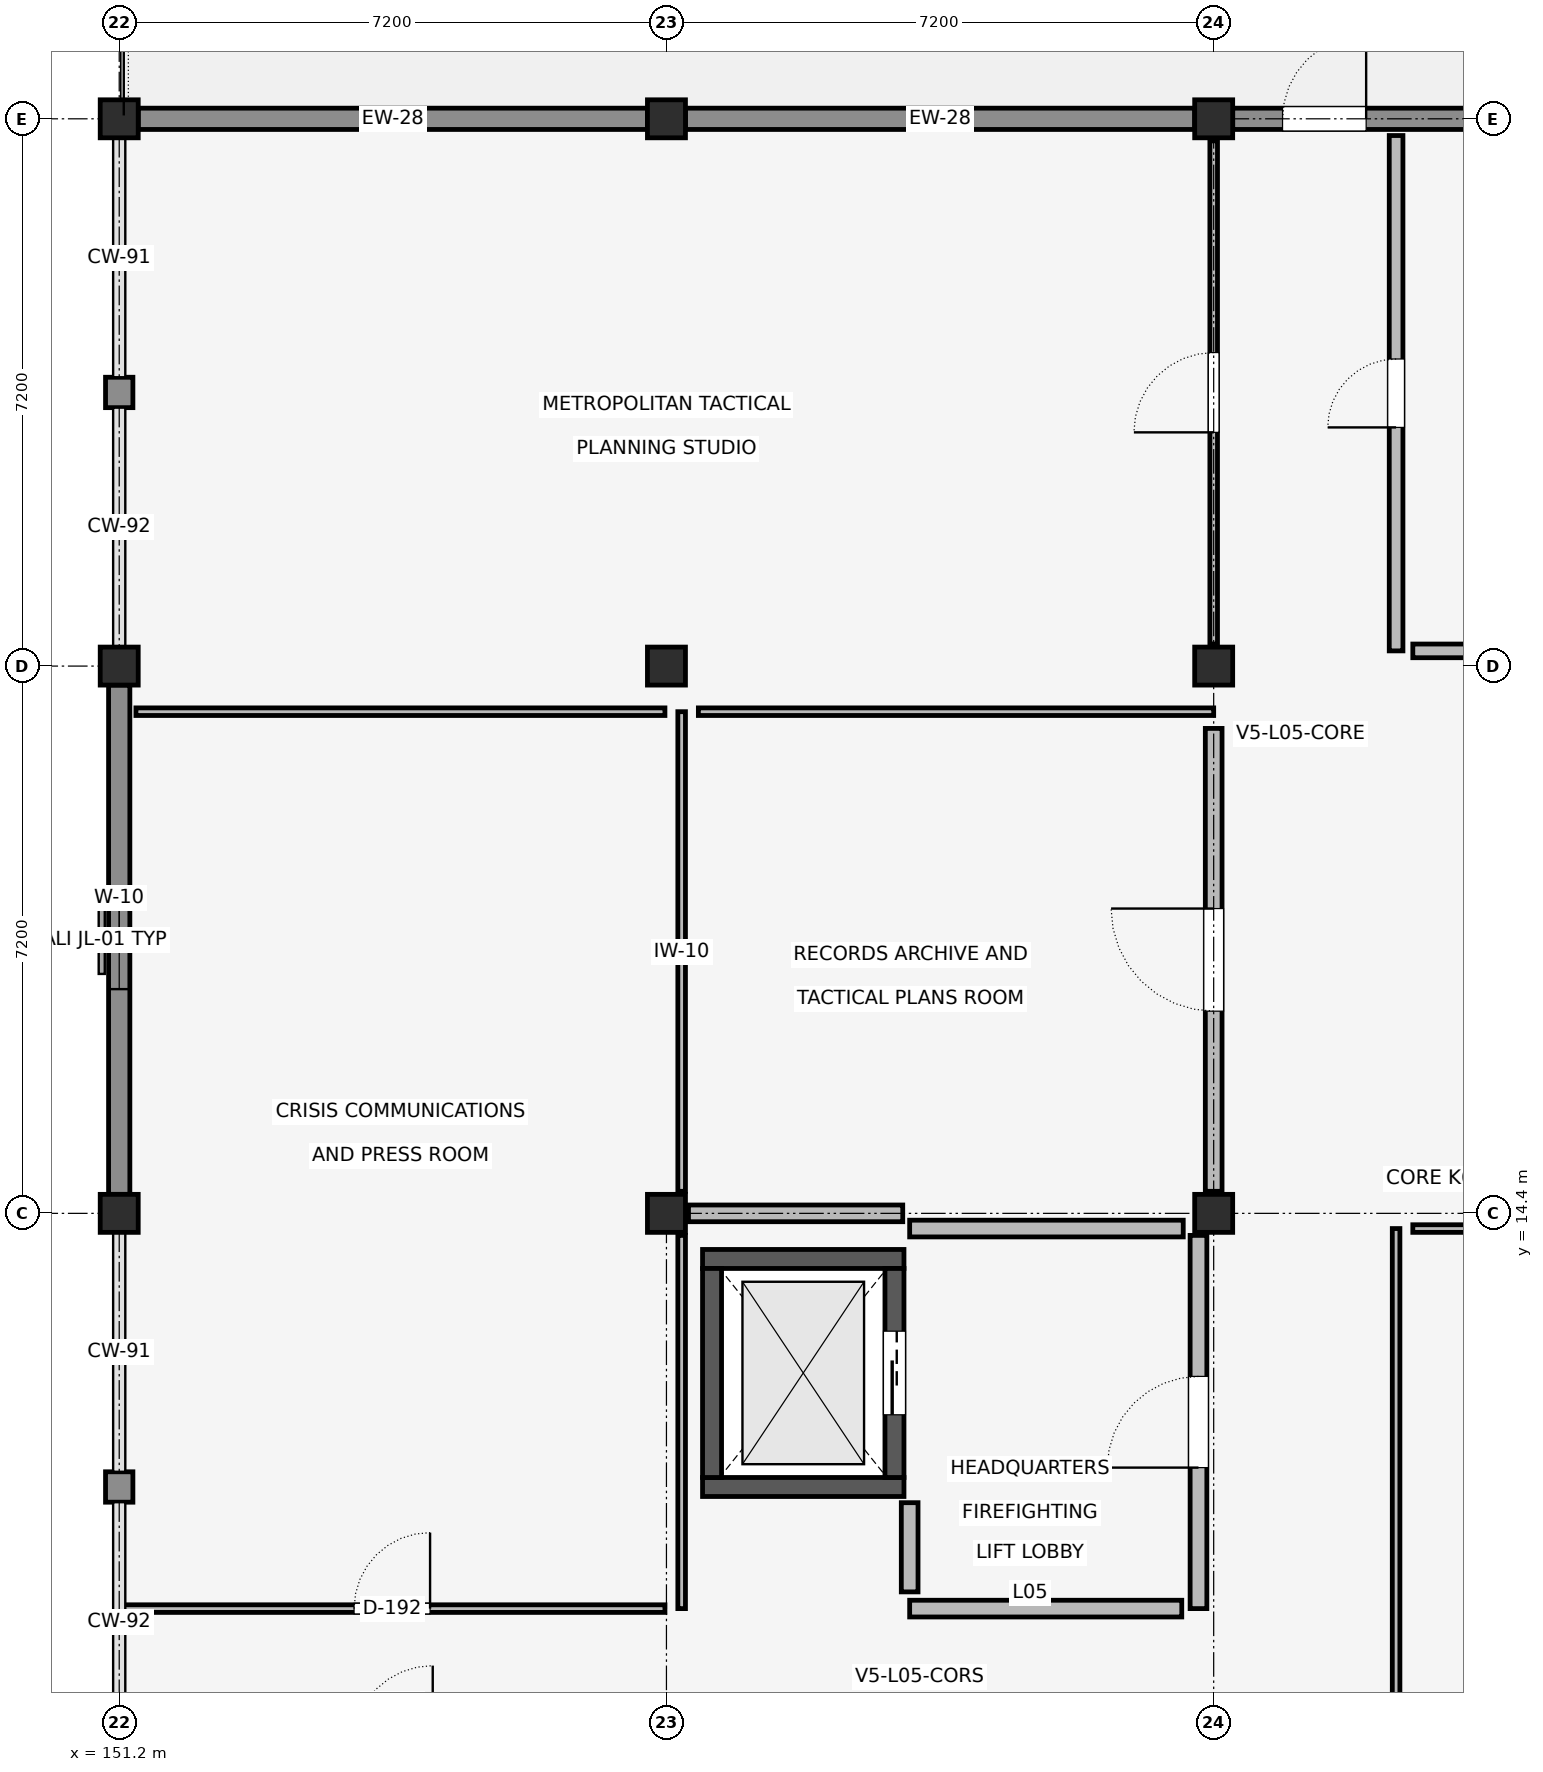
"""IFC4 building model, lengths in metres.
Left out: names, types, materials, properties, quantities, classifications, styles, units other than length and angle.
Written with IfcOpenShell. Run it as: python <this file> out.ifc"""

import sys

from ifc_helpers import new_model, si_unit, direction, frame, frame_2d, origin, origin_2d, place, context, subcontext, project, spatial, rectangle, extrude, element, fill, save


model = new_model("IFC4")
c1 = context("Model", 3, precision=1e-05, world=origin(), true_north=direction((0.0, 1.0)))
c2 = subcontext(c1, "Body", "Model", "MODEL_VIEW")
j1 = project(units=[si_unit("LENGTHUNIT", "METRE"), si_unit("PLANEANGLEUNIT", "RADIAN")], contexts=[c1])
p1 = place(None, origin())
s1 = spatial("IfcSite", under=j1, at=p1, CompositionType="ELEMENT")
p2 = place(p1, origin())
s2 = spatial("IfcBuilding", under=s1, at=p2, CompositionType="ELEMENT")
p3 = place(p2, frame((0.0, 0.0, 21.3)))
s3 = spatial("IfcBuildingStorey", under=s2, at=p3, CompositionType="ELEMENT", Elevation=21.3)
for number, where, z_axis, x_axis in (
    (1, (151.2, 14.4, 0.0), (0.0, 0.0, 1.0), (1.0, 0.0, 0.0)),
    (2, (151.2, 21.6, 0.0), (0.0, 0.0, 1.0), (1.0, 0.0, 0.0)),
    (3, (151.2, 28.8, 0.0), (0.0, 0.0, 1.0), (1.0, 0.0, 0.0)),
    (4, (158.4, 14.4, 0.0), (0.0, 0.0, 1.0), (1.0, 0.0, 0.0)),
    (5, (158.4, 21.6, 0.0), (0.0, 0.0, 1.0), (1.0, 0.0, 0.0)),
    (6, (158.4, 28.8, 0.0), (0.0, 0.0, 1.0), (1.0, 0.0, 0.0)),
    (7, (165.6, 14.4, 0.0), (0.0, 0.0, 1.0), (1.0, 0.0, 0.0)),
    (8, (165.6, 21.6, 0.0), (0.0, 0.0, 1.0), (1.0, 0.0, 0.0)),
    (9, (165.6, 28.8, 0.0), (0.0, 0.0, 1.0), (1.0, 0.0, 0.0)),
):
    element("IfcColumn", number, at=place(p3, frame(where, z_axis=z_axis, x_axis=x_axis)), inside=s3, PredefinedType="COLUMN", context=c2, shape_type="SweptSolid", body=[
        extrude(rectangle(XDim=0.5, YDim=0.5, at=origin_2d()), origin(), (0.0, 0.0, 1.0), 3.9),
    ])
for number, where, z_axis, x_axis in (
    (10, (158.875, 10.8, 0.0), (0.0, 0.0, 1.0), (1.0, 0.0, 0.0)),
    (11, (158.875, 13.8, 0.0), (0.0, 0.0, 1.0), (1.0, 0.0, 0.0)),
):
    element("IfcWall", number, at=place(p3, frame(where, z_axis=z_axis, x_axis=x_axis)), inside=s3, PredefinedType="SHEAR", context=c2, shape_type="SweptSolid", body=[
        extrude(rectangle(XDim=2.65, YDim=0.25, at=frame_2d((1.325, 0.0))), origin(), (0.0, 0.0, 1.0), 3.65),
    ])
p4 = place(p3, frame((159.0, 10.925, 0.0), z_axis=(0.0, 0.0, 1.0), x_axis=(0.0, 1.0, 0.0)))
e12 = element("IfcWall", 12, at=p4, inside=s3, PredefinedType="SHEAR", context=c2, shape_type="SweptSolid", body=[
    extrude(rectangle(XDim=2.75, YDim=0.25, at=frame_2d((1.375, 0.0))), origin(), (0.0, 0.0, 1.0), 3.65),
])
p5 = place(p3, frame((161.4, 10.925, 0.0), z_axis=(0.0, 0.0, 1.0), x_axis=(0.0, 1.0, 0.0)))
e13 = element("IfcWall", 13, at=p5, inside=s3, PredefinedType="SHEAR", context=c2, shape_type="SweptSolid", body=[
    extrude(rectangle(XDim=2.75, YDim=0.25, at=frame_2d((1.375, 0.0))), origin(), (0.0, 0.0, 1.0), 3.65),
])
p6 = place(p5, frame((0.825, 0.0, 0.0)))
e14 = element("IfcOpeningElement", 14, at=p6, cuts=e13, PredefinedType="OPENING", context=c2, shape_type="SweptSolid", body=[
    extrude(rectangle(XDim=1.1, YDim=2.15, at=frame_2d((0.55, 1.075))), frame((0.0, 0.137, 0.0), z_axis=(0.0, -1.0, 0.0), x_axis=(1.0, 0.0, 0.0)), (0.0, 0.0, 1.0), 0.274),
])
p7 = place(p3, frame((172.55, 28.8, 0.0), z_axis=(0.0, 0.0, 1.0), x_axis=(-1.0, 0.0, 0.0)))
e15 = element("IfcWall", 15, at=p7, inside=s3, PredefinedType="ELEMENTEDWALL", context=c2, shape_type="SweptSolid", body=[
    extrude(rectangle(XDim=6.7, YDim=0.28, at=frame_2d((3.35, 0.0))), origin(), (0.0, 0.0, 1.0), 2.94),
])
p8 = place(p7, frame((4.944, 0.0, 0.0)))
e16 = element("IfcOpeningElement", 16, at=p8, cuts=e15, PredefinedType="OPENING", context=c2, shape_type="SweptSolid", body=[
    extrude(rectangle(XDim=1.1, YDim=2.15, at=frame_2d((0.55, 1.075))), frame((0.0, 0.152, 0.0), z_axis=(0.0, -1.0, 0.0), x_axis=(1.0, 0.0, 0.0)), (0.0, 0.0, 1.0), 0.304),
])
p9 = place(p3, frame((165.35, 28.8, 0.0), z_axis=(0.0, 0.0, 1.0), x_axis=(-1.0, 0.0, 0.0)))
e17 = element("IfcWall", 17, at=p9, inside=s3, PredefinedType="ELEMENTEDWALL", context=c2, shape_type="SweptSolid", body=[
    extrude(rectangle(XDim=6.7, YDim=0.28, at=frame_2d((3.35, 0.0))), origin(), (0.0, 0.0, 1.0), 2.89),
])
p10 = place(p3, frame((158.15, 28.8, 0.0), z_axis=(0.0, 0.0, 1.0), x_axis=(-1.0, 0.0, 0.0)))
e18 = element("IfcWall", 18, at=p10, inside=s3, PredefinedType="ELEMENTEDWALL", context=c2, shape_type="SweptSolid", body=[
    extrude(rectangle(XDim=6.7, YDim=0.28, at=frame_2d((3.35, 0.0))), origin(), (0.0, 0.0, 1.0), 2.94),
])
p11 = place(p3, frame((151.2, 25.4, 0.0), z_axis=(0.0, 0.0, 1.0), x_axis=(0.0, -1.0, 0.0)))
e19 = element("IfcWall", 19, at=p11, inside=s3, PredefinedType="SOLIDWALL", context=c2, shape_type="SweptSolid", body=[
    extrude(rectangle(XDim=0.4, YDim=0.36, at=frame_2d((0.2, 0.0))), origin(), (0.0, 0.0, 1.0), 3.04),
])
p12 = place(p3, frame((151.2, 21.35, 0.0), z_axis=(0.0, 0.0, 1.0), x_axis=(0.0, -1.0, 0.0)))
e20 = element("IfcWall", 20, at=p12, inside=s3, PredefinedType="ELEMENTEDWALL", context=c2, shape_type="SweptSolid", body=[
    extrude(rectangle(XDim=6.7, YDim=0.28, at=frame_2d((3.35, 0.0))), origin(), (0.0, 0.0, 1.0), 2.99),
])
p13 = place(p12, frame((2.7, 0.0, 0.85)))
e21 = element("IfcOpeningElement", 21, at=p13, cuts=e20, PredefinedType="OPENING", context=c2, shape_type="SweptSolid", body=[
    extrude(rectangle(XDim=1.3, YDim=1.85, at=frame_2d((0.65, 0.925))), frame((0.0, 0.152, 0.0), z_axis=(0.0, -1.0, 0.0), x_axis=(1.0, 0.0, 0.0)), (0.0, 0.0, 1.0), 0.304),
])
p14 = place(p3, frame((151.2, 11.0, 0.0), z_axis=(0.0, 0.0, 1.0), x_axis=(0.0, -1.0, 0.0)))
e22 = element("IfcWall", 22, at=p14, inside=s3, PredefinedType="SOLIDWALL", context=c2, shape_type="SweptSolid", body=[
    extrude(rectangle(XDim=0.4, YDim=0.36, at=frame_2d((0.2, 0.0))), origin(), (0.0, 0.0, 1.0), 3.04),
])
p15 = place(p3, frame((165.4, 9.2, 0.0), z_axis=(0.0, 0.0, 1.0), x_axis=(0.0, 1.0, 0.0)))
e23 = element("IfcWall", 23, at=p15, inside=s3, PredefinedType="STANDARD", context=c2, shape_type="SweptSolid", body=[
    extrude(rectangle(XDim=4.91, YDim=0.22, at=frame_2d((2.455, 0.0))), origin(), (0.0, 0.0, 1.0), 3.038),
])
p16 = place(p15, frame((1.855, 0.0, 0.0)))
e24 = element("IfcOpeningElement", 24, at=p16, cuts=e23, PredefinedType="OPENING", context=c2, shape_type="SweptSolid", body=[
    extrude(rectangle(XDim=1.2, YDim=2.2, at=frame_2d((0.6, 1.1))), frame((0.0, 0.122, 0.0), z_axis=(0.0, -1.0, 0.0), x_axis=(1.0, 0.0, 0.0)), (0.0, 0.0, 1.0), 0.244),
])
p17 = place(p3, frame((161.6, 9.2, 0.0), z_axis=(0.0, 0.0, 1.0), x_axis=(1.0, 0.0, 0.0)))
e25 = element("IfcWall", 25, at=p17, inside=s3, PredefinedType="STANDARD", context=c2, shape_type="SweptSolid", body=[
    extrude(rectangle(XDim=3.58, YDim=0.22, at=frame_2d((1.79, 0.0))), origin(), (0.0, 0.0, 1.0), 3.62),
])
p18 = place(p3, frame((161.6, 14.2, 0.0), z_axis=(0.0, 0.0, 1.0), x_axis=(1.0, 0.0, 0.0)))
e26 = element("IfcWall", 26, at=p18, inside=s3, PredefinedType="STANDARD", context=c2, shape_type="SweptSolid", body=[
    extrude(rectangle(XDim=3.599, YDim=0.22, at=frame_2d((1.8, 0.0))), origin(), (0.0, 0.0, 1.0), 2.938),
])
p19 = place(p3, frame((161.6, 9.42, 0.0), z_axis=(0.0, 0.0, 1.0), x_axis=(0.0, 1.0, 0.0)))
e27 = element("IfcWall", 27, at=p19, inside=s3, PredefinedType="STANDARD", context=c2, shape_type="SweptSolid", body=[
    extrude(rectangle(XDim=1.174, YDim=0.22, at=frame_2d((0.587, 0.0))), origin(), (0.0, 0.0, 1.0), 3.62),
])
p20 = place(p3, frame((168.0, 0.0, 0.0), z_axis=(0.0, 0.0, 1.0), x_axis=(0.0, 1.0, 0.0)))
e28 = element("IfcWall", 28, at=p20, inside=s3, PredefinedType="PARTITIONING", context=c2, shape_type="SweptSolid", body=[
    extrude(rectangle(XDim=14.2, YDim=0.1, at=frame_2d((7.1, 0.0))), origin(), (0.0, 0.0, 1.0), 2.938),
])
p21 = place(p20, frame((6.6, 0.0, 0.0)))
e29 = element("IfcOpeningElement", 29, at=p21, cuts=e28, PredefinedType="OPENING", context=c2, shape_type="SweptSolid", body=[
    extrude(rectangle(XDim=1.0, YDim=2.15, at=frame_2d((0.5, 1.075))), frame((0.0, 0.062, 0.0), z_axis=(0.0, -1.0, 0.0), x_axis=(1.0, 0.0, 0.0)), (0.0, 0.0, 1.0), 0.124),
])
p22 = place(p3, frame((168.22, 14.2, 0.0), z_axis=(0.0, 0.0, 1.0), x_axis=(1.0, 0.0, 0.0)))
e30 = element("IfcWall", 30, at=p22, inside=s3, PredefinedType="PARTITIONING", context=c2, shape_type="SweptSolid", body=[
    extrude(rectangle(XDim=4.29, YDim=0.1, at=frame_2d((2.145, 0.0))), origin(), (0.0, 0.0, 1.0), 3.62),
])
p23 = place(p3, frame((158.6, 9.2, 0.0), z_axis=(0.0, 0.0, 1.0), x_axis=(0.0, 1.0, 0.0)))
e31 = element("IfcWall", 31, at=p23, inside=s3, PredefinedType="PARTITIONING", context=c2, shape_type="SweptSolid", body=[
    extrude(rectangle(XDim=4.91, YDim=0.1, at=frame_2d((2.455, 0.0))), origin(), (0.0, 0.0, 1.0), 3.038),
])
p24 = place(p3, frame((158.6, 14.69, 0.0), z_axis=(0.0, 0.0, 1.0), x_axis=(0.0, 1.0, 0.0)))
e32 = element("IfcWall", 32, at=p24, inside=s3, PredefinedType="PARTITIONING", context=c2, shape_type="SweptSolid", body=[
    extrude(rectangle(XDim=6.31, YDim=0.1, at=frame_2d((3.155, 0.0))), origin(), (0.0, 0.0, 1.0), 2.988),
])
p25 = place(p3, frame((151.2, 9.2, 0.0), z_axis=(0.0, 0.0, 1.0), x_axis=(1.0, 0.0, 0.0)))
e33 = element("IfcWall", 33, at=p25, inside=s3, PredefinedType="PARTITIONING", context=c2, shape_type="SweptSolid", body=[
    extrude(rectangle(XDim=7.18, YDim=0.1, at=frame_2d((3.59, 0.0))), origin(), (0.0, 0.0, 1.0), 3.038),
])
p26 = place(p25, frame((3.09, 0.0, 0.0)))
e34 = element("IfcOpeningElement", 34, at=p26, cuts=e33, PredefinedType="OPENING", context=c2, shape_type="SweptSolid", body=[
    extrude(rectangle(XDim=1.0, YDim=2.15, at=frame_2d((0.5, 1.075))), frame((0.0, 0.062, 0.0), z_axis=(0.0, -1.0, 0.0), x_axis=(1.0, 0.0, 0.0)), (0.0, 0.0, 1.0), 0.124),
])
p27 = place(p3, frame((151.42, 21.0, 0.0), z_axis=(0.0, 0.0, 1.0), x_axis=(1.0, 0.0, 0.0)))
e35 = element("IfcWall", 35, at=p27, inside=s3, PredefinedType="PARTITIONING", context=c2, shape_type="SweptSolid", body=[
    extrude(rectangle(XDim=6.96, YDim=0.1, at=frame_2d((3.48, 0.0))), origin(), (0.0, 0.0, 1.0), 2.988),
])
p28 = place(p3, frame((165.6, 21.89, 0.0), z_axis=(0.0, 0.0, 1.0), x_axis=(0.0, 1.0, 0.0)))
e36 = element("IfcWall", 36, at=p28, inside=s3, PredefinedType="PARTITIONING", context=c2, shape_type="SweptSolid", body=[
    extrude(rectangle(XDim=6.62, YDim=0.1, at=frame_2d((3.31, 0.0))), origin(), (0.0, 0.0, 1.0), 3.038),
])
p29 = place(p28, frame((2.785, 0.0, 0.0)))
e37 = element("IfcOpeningElement", 37, at=p29, cuts=e36, PredefinedType="OPENING", context=c2, shape_type="SweptSolid", body=[
    extrude(rectangle(XDim=1.05, YDim=2.15, at=frame_2d((0.525, 1.075))), frame((0.0, 0.062, 0.0), z_axis=(0.0, -1.0, 0.0), x_axis=(1.0, 0.0, 0.0)), (0.0, 0.0, 1.0), 0.124),
])
p30 = place(p3, frame((158.82, 21.0, 0.0), z_axis=(0.0, 0.0, 1.0), x_axis=(1.0, 0.0, 0.0)))
e38 = element("IfcWall", 38, at=p30, inside=s3, PredefinedType="PARTITIONING", context=c2, shape_type="SweptSolid", body=[
    extrude(rectangle(XDim=6.78, YDim=0.1, at=frame_2d((3.39, 0.0))), origin(), (0.0, 0.0, 1.0), 2.988),
])
p31 = place(p3, frame((165.6, 14.69, 0.0), z_axis=(0.0, 0.0, 1.0), x_axis=(0.0, 1.0, 0.0)))
e39 = element("IfcWall", 39, at=p31, inside=s3, PredefinedType="STANDARD", context=c2, shape_type="SweptSolid", body=[
    extrude(rectangle(XDim=6.09, YDim=0.22, at=frame_2d((3.045, 0.0))), origin(), (0.0, 0.0, 1.0), 2.988),
])
p32 = place(p31, frame((2.37, 0.0, 0.0)))
e40 = element("IfcOpeningElement", 40, at=p32, cuts=e39, PredefinedType="OPENING", context=c2, shape_type="SweptSolid", body=[
    extrude(rectangle(XDim=1.35, YDim=2.2, at=frame_2d((0.675, 1.1))), frame((0.0, 0.122, 0.0), z_axis=(0.0, -1.0, 0.0), x_axis=(1.0, 0.0, 0.0)), (0.0, 0.0, 1.0), 0.244),
])
p33 = place(p3, frame((158.69, 14.4, 0.0), z_axis=(0.0, 0.0, 1.0), x_axis=(1.0, 0.0, 0.0)))
e41 = element("IfcWall", 41, at=p33, inside=s3, PredefinedType="STANDARD", context=c2, shape_type="SweptSolid", body=[
    extrude(rectangle(XDim=2.819, YDim=0.22, at=frame_2d((1.409, 0.0))), origin(), (0.0, 0.0, 1.0), 2.938),
])
p34 = place(p3, frame((168.0, 21.8, 0.0), z_axis=(0.0, 0.0, 1.0), x_axis=(0.0, 1.0, 0.0)))
e42 = element("IfcWall", 42, at=p34, inside=s3, PredefinedType="PLUMBINGWALL", context=c2, shape_type="SweptSolid", body=[
    extrude(rectangle(XDim=6.78, YDim=0.18, at=frame_2d((3.39, 0.0))), origin(), (0.0, 0.0, 1.0), 2.888),
])
p35 = place(p34, frame((2.94, 0.0, 0.0)))
e43 = element("IfcOpeningElement", 43, at=p35, cuts=e42, PredefinedType="OPENING", context=c2, shape_type="SweptSolid", body=[
    extrude(rectangle(XDim=0.9, YDim=2.1, at=frame_2d((0.45, 1.05))), frame((0.0, 0.102, 0.0), z_axis=(0.0, -1.0, 0.0), x_axis=(1.0, 0.0, 0.0)), (0.0, 0.0, 1.0), 0.204),
])
p36 = place(p3, frame((168.22, 21.8, 0.0), z_axis=(0.0, 0.0, 1.0), x_axis=(1.0, 0.0, 0.0)))
e44 = element("IfcWall", 44, at=p36, inside=s3, PredefinedType="PLUMBINGWALL", context=c2, shape_type="SweptSolid", body=[
    extrude(rectangle(XDim=4.29, YDim=0.18, at=frame_2d((2.145, 0.0))), origin(), (0.0, 0.0, 1.0), 2.888),
])
p37 = place(p8, frame((1.1, 0.0, 0.0), z_axis=(0.0, 0.0, 1.0), x_axis=(-1.0, 0.0, 0.0)))
e45 = element("IfcDoor", 45, at=p37, inside=s3, OperationType="SINGLE_SWING_RIGHT", PredefinedType="DOOR", context=c2, shape_type="SweptSolid", body=[
    extrude(rectangle(XDim=1.1, YDim=2.15, at=frame_2d((0.55, 1.075))), frame((0.0, 0.025, 0.0), z_axis=(0.0, -1.0, 0.0), x_axis=(1.0, 0.0, 0.0)), (0.0, 0.0, 1.0), 0.05),
])
fill(e16, e45)
p38 = place(p13, origin())
e46 = element("IfcWindow", 46, at=p38, inside=s3, PartitioningType="SINGLE_PANEL", PredefinedType="WINDOW", context=c2, shape_type="SweptSolid", body=[
    extrude(rectangle(XDim=1.3, YDim=1.85, at=frame_2d((0.65, 0.925))), frame((0.0, 0.03, 0.0), z_axis=(0.0, -1.0, 0.0), x_axis=(1.0, 0.0, 0.0)), (0.0, 0.0, 1.0), 0.06),
])
fill(e21, e46)
p39 = place(p6, origin())
e47 = element("IfcDoor", 47, at=p39, inside=s3, OperationType="SLIDING_TO_LEFT", PredefinedType="DOOR", context=c2, shape_type="SweptSolid", body=[
    extrude(rectangle(XDim=1.1, YDim=2.15, at=frame_2d((0.55, 1.075))), frame((0.0, 0.025, 0.0), z_axis=(0.0, -1.0, 0.0), x_axis=(1.0, 0.0, 0.0)), (0.0, 0.0, 1.0), 0.05),
])
fill(e14, e47)
p40 = place(p16, origin())
e48 = element("IfcDoor", 48, at=p40, inside=s3, OperationType="SINGLE_SWING_LEFT", PredefinedType="DOOR", context=c2, shape_type="SweptSolid", body=[
    extrude(rectangle(XDim=1.2, YDim=2.2, at=frame_2d((0.6, 1.1))), frame((0.0, 0.025, 0.0), z_axis=(0.0, -1.0, 0.0), x_axis=(1.0, 0.0, 0.0)), (0.0, 0.0, 1.0), 0.05),
])
fill(e24, e48)
p41 = place(p26, origin())
e49 = element("IfcDoor", 49, at=p41, inside=s3, OperationType="SINGLE_SWING_RIGHT", PredefinedType="DOOR", context=c2, shape_type="SweptSolid", body=[
    extrude(rectangle(XDim=1.0, YDim=2.15, at=frame_2d((0.5, 1.075))), frame((0.0, 0.025, 0.0), z_axis=(0.0, -1.0, 0.0), x_axis=(1.0, 0.0, 0.0)), (0.0, 0.0, 1.0), 0.05),
])
fill(e34, e49)
p42 = place(p29, origin())
e50 = element("IfcDoor", 50, at=p42, inside=s3, OperationType="SINGLE_SWING_LEFT", PredefinedType="DOOR", context=c2, shape_type="SweptSolid", body=[
    extrude(rectangle(XDim=1.05, YDim=2.15, at=frame_2d((0.525, 1.075))), frame((0.0, 0.025, 0.0), z_axis=(0.0, -1.0, 0.0), x_axis=(1.0, 0.0, 0.0)), (0.0, 0.0, 1.0), 0.05),
])
fill(e37, e50)
p43 = place(p32, origin())
e51 = element("IfcDoor", 51, at=p43, inside=s3, OperationType="SINGLE_SWING_RIGHT", PredefinedType="DOOR", context=c2, shape_type="SweptSolid", body=[
    extrude(rectangle(XDim=1.35, YDim=2.2, at=frame_2d((0.675, 1.1))), frame((0.0, 0.025, 0.0), z_axis=(0.0, -1.0, 0.0), x_axis=(1.0, 0.0, 0.0)), (0.0, 0.0, 1.0), 0.05),
])
fill(e40, e51)
p44 = place(p35, origin())
e52 = element("IfcDoor", 52, at=p44, inside=s3, OperationType="SINGLE_SWING_LEFT", PredefinedType="DOOR", context=c2, shape_type="SweptSolid", body=[
    extrude(rectangle(XDim=0.9, YDim=2.1, at=frame_2d((0.45, 1.05))), frame((0.0, 0.025, 0.0), z_axis=(0.0, -1.0, 0.0), x_axis=(1.0, 0.0, 0.0)), (0.0, 0.0, 1.0), 0.05),
])
fill(e43, e52)
save(model, sys.argv[1])
